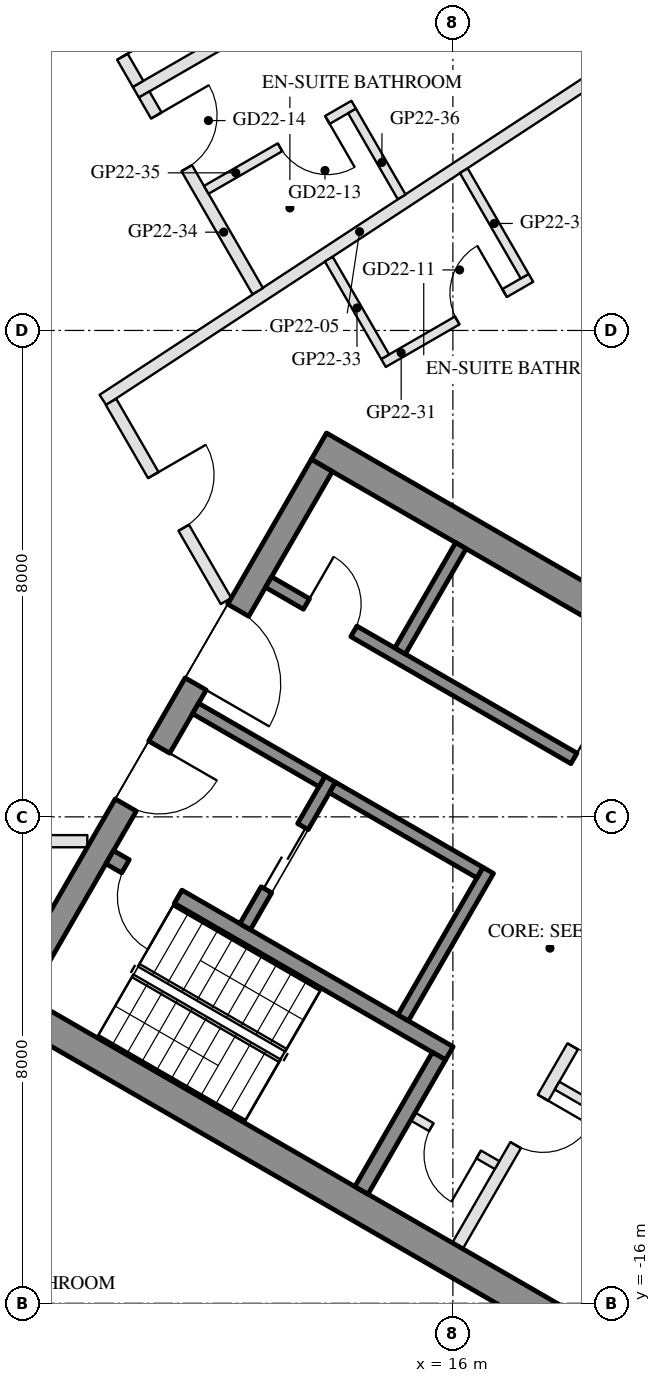
"""IFC4 building model, lengths in metres.
Left out: names, types, materials, properties, quantities, classifications, styles, units other than length and angle.
Written with IfcOpenShell. Run it as: python <this file> out.ifc"""

import sys

from ifc_helpers import new_model, si_unit, direction, frame, frame_2d, origin, place, context, subcontext, project, spatial, rectangle, extrude, element, fill, save


model = new_model("IFC4")
c1 = context("Model", 3, precision=1e-05, world=origin(), true_north=direction((0.0, 1.0)))
c2 = subcontext(c1, "Body", "Model", "MODEL_VIEW")
j1 = project(units=[si_unit("LENGTHUNIT", "METRE"), si_unit("PLANEANGLEUNIT", "RADIAN")], contexts=[c1])
p1 = place(None, origin())
s1 = spatial("IfcSite", under=j1, at=p1, CompositionType="ELEMENT")
p2 = place(p1, origin())
s2 = spatial("IfcBuilding", under=s1, at=p2, CompositionType="ELEMENT")
p3 = place(p2, frame((0.0, 0.0, 224.3)))
s3 = spatial("IfcBuildingStorey", under=s2, at=p3, CompositionType="ELEMENT", Elevation=224.3)
p4 = place(p3, frame((19.729, 2.938, 0.0), z_axis=(0.0, 0.0, 1.0), x_axis=(-0.499976430342, 0.866039011305, 0.0)))
e1 = element("IfcWall", 1, at=p4, inside=s3, PredefinedType="SOLIDWALL", context=c2, shape_type="SweptSolid", body=[
    extrude(rectangle(XDim=6.74, YDim=0.35, at=frame_2d((3.37, 0.0))), origin(), (0.0, 0.0, 1.0), 3.55),
])
p5 = place(p4, frame((2.229, 0.0, 0.0)))
e2 = element("IfcOpeningElement", 2, at=p5, cuts=e1, PredefinedType="OPENING", context=c2, shape_type="SweptSolid", body=[
    extrude(rectangle(XDim=1.5, YDim=2.4, at=frame_2d((0.75, 1.2))), frame((0.0, 0.185, 0.0), z_axis=(0.0, -1.0, 0.0), x_axis=(1.0, 0.0, 0.0)), (0.0, 0.0, 1.0), 0.37),
])
p6 = place(p4, frame((4.029, 0.0, 0.3)))
e3 = element("IfcOpeningElement", 3, at=p6, cuts=e1, PredefinedType="OPENING", context=c2, shape_type="SweptSolid", body=[
    extrude(rectangle(XDim=0.8, YDim=2.65, at=frame_2d((0.4, 1.325))), frame((0.0, 0.185, 0.0), z_axis=(0.0, -1.0, 0.0), x_axis=(1.0, 0.0, 0.0)), (0.0, 0.0, 1.0), 0.37),
])
for number, where, z_axis, x_axis in (
    (4, (8.547, -10.997, 0.0), (0.0, 0.0, 1.0), (0.866, -0.5, 0.0)),
    (5, (13.797, -1.903, 0.0), (0.0, 0.0, 1.0), (0.866, -0.5, 0.0)),
):
    element("IfcWall", number, at=place(p3, frame(where, z_axis=z_axis, x_axis=x_axis)), inside=s3, PredefinedType="SHEAR", context=c2, shape_type="SweptSolid", body=[
        extrude(rectangle(XDim=14.837, YDim=0.5, at=frame_2d((7.418, 0.0))), origin(), (0.0, 0.0, 1.0), 3.5),
    ])
p7 = place(p3, frame((8.845, -10.88, 0.0), z_axis=(0.0, 0.0, 1.0), x_axis=(0.500004234368, 0.866022959057, 0.0)))
e6 = element("IfcWall", 6, at=p7, inside=s3, PredefinedType="SHEAR", context=c2, shape_type="SweptSolid", body=[
    extrude(rectangle(XDim=10.0, YDim=0.4, at=frame_2d((5.0, 0.0))), origin(), (0.0, 0.0, 1.0), 3.5),
])
p8 = place(p7, frame((3.55, 0.0, 0.0)))
e7 = element("IfcOpeningElement", 7, at=p8, cuts=e6, PredefinedType="OPENING", context=c2, shape_type="SweptSolid", body=[
    extrude(rectangle(XDim=1.1, YDim=2.1, at=frame_2d((0.55, 1.05))), frame((0.0, 0.21, 0.0), z_axis=(0.0, -1.0, 0.0), x_axis=(1.0, 0.0, 0.0)), (0.0, 0.0, 1.0), 0.42),
])
p9 = place(p7, frame((5.85, 0.0, 0.0)))
e8 = element("IfcOpeningElement", 8, at=p9, cuts=e6, PredefinedType="OPENING", context=c2, shape_type="SweptSolid", body=[
    extrude(rectangle(XDim=1.4, YDim=2.1, at=frame_2d((0.7, 1.05))), frame((0.0, 0.21, 0.0), z_axis=(0.0, -1.0, 0.0), x_axis=(1.0, 0.0, 0.0)), (0.0, 0.0, 1.0), 0.42),
])
p10 = place(p3, frame((10.356, -8.664, 0.0), z_axis=(0.0, 0.0, 1.0), x_axis=(0.866028629588, -0.499994412703, 0.0)))
e9 = element("IfcWall", 9, at=p10, inside=s3, PredefinedType="SHEAR", context=c2, shape_type="SweptSolid", body=[
    extrude(rectangle(XDim=6.45, YDim=0.25, at=frame_2d((3.225, 0.0))), origin(), (0.0, 0.0, 1.0), 3.5),
])
p11 = place(p10, frame((0.3, 0.0, 0.0)))
e10 = element("IfcOpeningElement", 10, at=p11, cuts=e9, PredefinedType="OPENING", context=c2, shape_type="SweptSolid", body=[
    extrude(rectangle(XDim=1.0, YDim=2.1, at=frame_2d((0.5, 1.05))), frame((0.0, 0.135, 0.0), z_axis=(0.0, -1.0, 0.0), x_axis=(1.0, 0.0, 0.0)), (0.0, 0.0, 1.0), 0.27),
])
p12 = place(p3, frame((14.496, -14.143, 0.0), z_axis=(0.0, 0.0, 1.0), x_axis=(0.500062241894, 0.865989465428, 0.0)))
e11 = element("IfcWall", 11, at=p12, inside=s3, PredefinedType="SHEAR", context=c2, shape_type="SweptSolid", body=[
    extrude(rectangle(XDim=2.55, YDim=0.25, at=frame_2d((1.275, 0.0))), origin(), (0.0, 0.0, 1.0), 3.5),
])
p13 = place(p3, frame((15.181, -11.305, 0.0), z_axis=(0.0, 0.0, 1.0), x_axis=(0.49994636267, 0.866056369097, 0.0)))
e12 = element("IfcWall", 12, at=p13, inside=s3, PredefinedType="SHEAR", context=c2, shape_type="SweptSolid", body=[
    extrude(rectangle(XDim=2.8, YDim=0.2, at=frame_2d((1.4, 0.0))), origin(), (0.0, 0.0, 1.0), 3.5),
])
p14 = place(p3, frame((12.583, -9.805, 0.0), z_axis=(0.0, 0.0, 1.0), x_axis=(0.49994636267, 0.866056369097, 0.0)))
e13 = element("IfcWall", 13, at=p14, inside=s3, PredefinedType="SHEAR", context=c2, shape_type="SweptSolid", body=[
    extrude(rectangle(XDim=2.8, YDim=0.2, at=frame_2d((1.4, 0.0))), origin(), (0.0, 0.0, 1.0), 3.5),
])
p15 = place(p14, frame((0.7, 0.0, 0.0)))
e14 = element("IfcOpeningElement", 14, at=p15, cuts=e13, PredefinedType="OPENING", context=c2, shape_type="SweptSolid", body=[
    extrude(rectangle(XDim=1.2, YDim=2.1, at=frame_2d((0.6, 1.05))), frame((0.0, 0.11, 0.0), z_axis=(0.0, -1.0, 0.0), x_axis=(1.0, 0.0, 0.0)), (0.0, 0.0, 1.0), 0.22),
])
p16 = place(p3, frame((11.768, -6.217, 0.0), z_axis=(0.0, 0.0, 1.0), x_axis=(0.866050077142, -0.499957262057, 0.0)))
e15 = element("IfcWall", 15, at=p16, inside=s3, PredefinedType="SHEAR", context=c2, shape_type="SweptSolid", body=[
    extrude(rectangle(XDim=2.4, YDim=0.2, at=frame_2d((1.2, 0.0))), origin(), (0.0, 0.0, 1.0), 3.5),
])
p17 = place(p3, frame((14.02, -7.517, 0.0), z_axis=(0.0, 0.0, 1.0), x_axis=(0.866034573852, -0.49998411664, 0.0)))
e16 = element("IfcWall", 16, at=p17, inside=s3, PredefinedType="SHEAR", context=c2, shape_type="SweptSolid", body=[
    extrude(rectangle(XDim=2.8, YDim=0.2, at=frame_2d((1.4, 0.0))), origin(), (0.0, 0.0, 1.0), 3.5),
])
p18 = place(p3, frame((12.968, -4.138, 0.0), z_axis=(0.0, 0.0, 1.0), x_axis=(0.866028328073, -0.49999493495, 0.0)))
e17 = element("IfcWall", 17, at=p18, inside=s3, PredefinedType="SHEAR", context=c2, shape_type="SweptSolid", body=[
    extrude(rectangle(XDim=10.16, YDim=0.2, at=frame_2d((5.08, 0.0))), origin(), (0.0, 0.0, 1.0), 3.5),
])
p19 = place(p18, frame((0.72, 0.0, 0.0)))
e18 = element("IfcOpeningElement", 18, at=p19, cuts=e17, PredefinedType="OPENING", context=c2, shape_type="SweptSolid", body=[
    extrude(rectangle(XDim=0.9, YDim=2.1, at=frame_2d((0.45, 1.05))), frame((0.0, 0.11, 0.0), z_axis=(0.0, -1.0, 0.0), x_axis=(1.0, 0.0, 0.0)), (0.0, 0.0, 1.0), 0.22),
])
p20 = place(p18, frame((5.8, 0.0, 0.0)))
e19 = element("IfcOpeningElement", 19, at=p20, cuts=e17, PredefinedType="OPENING", context=c2, shape_type="SweptSolid", body=[
    extrude(rectangle(XDim=0.9, YDim=2.1, at=frame_2d((0.45, 1.05))), frame((0.0, 0.11, 0.0), z_axis=(0.0, -1.0, 0.0), x_axis=(1.0, 0.0, 0.0)), (0.0, 0.0, 1.0), 0.22),
])
p21 = place(p3, frame((15.131, -5.272, 0.0), z_axis=(0.0, 0.0, 1.0), x_axis=(0.499972520799, 0.866041268327, 0.0)))
e20 = element("IfcWall", 20, at=p21, inside=s3, PredefinedType="SHEAR", context=c2, shape_type="SweptSolid", body=[
    extrude(rectangle(XDim=2.0, YDim=0.2, at=frame_2d((1.0, 0.0))), origin(), (0.0, 0.0, 1.0), 3.5),
])
p22 = place(p3, frame((16.076, -15.055, 0.0), z_axis=(0.0, 0.0, 1.0), x_axis=(0.499995103361, 0.866028230842, 0.0)))
e21 = element("IfcWall", 21, at=p22, inside=s3, PredefinedType="PARTITIONING", context=c2, shape_type="SweptSolid", body=[
    extrude(rectangle(XDim=5.4, YDim=0.2, at=frame_2d((2.7, 0.0))), origin(), (0.0, 0.0, 1.0), 3.5),
])
p23 = place(p22, frame((1.913, 0.0, 0.0)))
e22 = element("IfcOpeningElement", 22, at=p23, cuts=e21, PredefinedType="OPENING", context=c2, shape_type="SweptSolid", body=[
    extrude(rectangle(XDim=0.9, YDim=2.1, at=frame_2d((0.45, 1.05))), frame((0.0, 0.11, 0.0), z_axis=(0.0, -1.0, 0.0), x_axis=(1.0, 0.0, 0.0)), (0.0, 0.0, 1.0), 0.22),
])
p24 = place(p22, frame((3.788, 0.0, 0.0)))
e23 = element("IfcOpeningElement", 23, at=p24, cuts=e21, PredefinedType="OPENING", context=c2, shape_type="SweptSolid", body=[
    extrude(rectangle(XDim=0.9, YDim=2.1, at=frame_2d((0.45, 1.05))), frame((0.0, 0.11, 0.0), z_axis=(0.0, -1.0, 0.0), x_axis=(1.0, 0.0, 0.0)), (0.0, 0.0, 1.0), 0.22),
])
p25 = place(p3, frame((15.342, -12.928, 0.0), z_axis=(0.0, 0.0, 1.0), x_axis=(0.865989903783, -0.500061482766, 0.0)))
e24 = element("IfcWall", 24, at=p25, inside=s3, PredefinedType="PARTITIONING", context=c2, shape_type="SweptSolid", body=[
    extrude(rectangle(XDim=1.6, YDim=0.15, at=frame_2d((0.8, 0.0))), origin(), (0.0, 0.0, 1.0), 3.5),
])
p26 = place(p25, frame((0.35, 0.0, 0.0)))
e25 = element("IfcOpeningElement", 25, at=p26, cuts=e24, PredefinedType="OPENING", context=c2, shape_type="SweptSolid", body=[
    extrude(rectangle(XDim=0.9, YDim=2.1, at=frame_2d((0.45, 1.05))), frame((0.0, 0.085, 0.0), z_axis=(0.0, -1.0, 0.0), x_axis=(1.0, 0.0, 0.0)), (0.0, 0.0, 1.0), 0.17),
])
p27 = place(p3, frame((17.713, -12.42, 0.0), z_axis=(0.0, 0.0, 1.0), x_axis=(0.866016523273, -0.500015381182, 0.0)))
e26 = element("IfcWall", 26, at=p27, inside=s3, PredefinedType="PARTITIONING", context=c2, shape_type="SweptSolid", body=[
    extrude(rectangle(XDim=6.95, YDim=0.15, at=frame_2d((3.475, 0.0))), origin(), (0.0, 0.0, 1.0), 3.5),
])
p28 = place(p3, frame((18.688, 4.391, 0.0), z_axis=(0.0, 0.0, 1.0), x_axis=(-0.836395760685, -0.548126017909, 0.0)))
e27 = element("IfcWall", 27, at=p28, inside=s3, PredefinedType="PARTITIONING", context=c2, shape_type="SweptSolid", body=[
    extrude(rectangle(XDim=10.096, YDim=0.2, at=frame_2d((5.048, 0.0))), origin(), (0.0, 0.0, 1.0), 3.06),
])
p29 = place(p3, frame((16.917, 7.458, 0.0), z_axis=(0.0, 0.0, 1.0), x_axis=(-0.866019052629, -0.500011000363, 0.0)))
e28 = element("IfcWall", 28, at=p29, inside=s3, PredefinedType="PARTITIONING", context=c2, shape_type="SweptSolid", body=[
    extrude(rectangle(XDim=7.08, YDim=0.2, at=frame_2d((3.54, 0.0))), origin(), (0.0, 0.0, 1.0), 3.06),
])
p30 = place(p3, frame((9.988, -8.4, 0.0), z_axis=(0.0, 0.0, 1.0), x_axis=(-1.0, 0.0, 0.0)))
e29 = element("IfcWall", 29, at=p30, inside=s3, PredefinedType="PARTITIONING", context=c2, shape_type="SweptSolid", body=[
    extrude(rectangle(XDim=3.788, YDim=0.2, at=frame_2d((1.894, 0.0))), origin(), (0.0, 0.0, 1.0), 2.95),
])
p31 = place(p30, frame((1.394, 0.0, 0.0)))
e30 = element("IfcOpeningElement", 30, at=p31, cuts=e29, PredefinedType="OPENING", context=c2, shape_type="SweptSolid", body=[
    extrude(rectangle(XDim=1.0, YDim=2.1, at=frame_2d((0.5, 1.05))), frame((0.0, 0.11, 0.0), z_axis=(0.0, -1.0, 0.0), x_axis=(1.0, 0.0, 0.0)), (0.0, 0.0, 1.0), 0.22),
])
p32 = place(p3, frame((10.377, -1.174, 0.0), z_axis=(0.0, 0.0, 1.0), x_axis=(0.500033471514, -0.866006078134, 0.0)))
e31 = element("IfcWall", 31, at=p32, inside=s3, PredefinedType="PARTITIONING", context=c2, shape_type="SweptSolid", body=[
    extrude(rectangle(XDim=3.782, YDim=0.2, at=frame_2d((1.891, 0.0))), origin(), (0.0, 0.0, 1.0), 2.95),
])
p33 = place(p32, frame((1.391, 0.0, 0.0)))
e32 = element("IfcOpeningElement", 32, at=p33, cuts=e31, PredefinedType="OPENING", context=c2, shape_type="SweptSolid", body=[
    extrude(rectangle(XDim=1.0, YDim=2.1, at=frame_2d((0.5, 1.05))), frame((0.0, 0.11, 0.0), z_axis=(0.0, -1.0, 0.0), x_axis=(1.0, 0.0, 0.0)), (0.0, 0.0, 1.0), 0.22),
])
p34 = place(p3, frame((14.858, -0.536, 0.0), z_axis=(0.0, 0.0, 1.0), x_axis=(0.866056369097, 0.49994636267, 0.0)))
e33 = element("IfcWall", 33, at=p34, inside=s3, PredefinedType="PARTITIONING", context=c2, shape_type="SweptSolid", body=[
    extrude(rectangle(XDim=2.8, YDim=0.15, at=frame_2d((1.4, 0.0))), origin(), (0.0, 0.0, 1.0), 2.95),
])
p35 = place(p34, frame((1.4, 0.0, 0.0)))
e34 = element("IfcOpeningElement", 34, at=p35, cuts=e33, PredefinedType="OPENING", context=c2, shape_type="SweptSolid", body=[
    extrude(rectangle(XDim=0.9, YDim=2.1, at=frame_2d((0.45, 1.05))), frame((0.0, 0.085, 0.0), z_axis=(0.0, -1.0, 0.0), x_axis=(1.0, 0.0, 0.0)), (0.0, 0.0, 1.0), 0.17),
])
p36 = place(p3, frame((17.181, 0.892, 0.0), z_axis=(0.0, 0.0, 1.0), x_axis=(-0.500056363668, 0.86599285976, 0.0)))
e35 = element("IfcWall", 35, at=p36, inside=s3, PredefinedType="PARTITIONING", context=c2, shape_type="SweptSolid", body=[
    extrude(rectangle(XDim=2.004, YDim=0.15, at=frame_2d((1.002, 0.0))), origin(), (0.0, 0.0, 1.0), 2.95),
])
p37 = place(p3, frame((14.886, -0.433, 0.0), z_axis=(0.0, 0.0, 1.0), x_axis=(-0.500075767815, 0.865981654797, 0.0)))
e36 = element("IfcWall", 36, at=p37, inside=s3, PredefinedType="PARTITIONING", context=c2, shape_type="SweptSolid", body=[
    extrude(rectangle(XDim=1.854, YDim=0.15, at=frame_2d((0.927, 0.0))), origin(), (0.0, 0.0, 1.0), 2.95),
])
p38 = place(p3, frame((10.923, 3.881, 0.0), z_axis=(0.0, 0.0, 1.0), x_axis=(0.499997756806, -0.866026698889, 0.0)))
e37 = element("IfcWall", 37, at=p38, inside=s3, PredefinedType="PARTITIONING", context=c2, shape_type="SweptSolid", body=[
    extrude(rectangle(XDim=3.736, YDim=0.2, at=frame_2d((1.868, 0.0))), origin(), (0.0, 0.0, 1.0), 2.95),
])
p39 = place(p38, frame((0.4, 0.0, 0.0)))
e38 = element("IfcOpeningElement", 38, at=p39, cuts=e37, PredefinedType="OPENING", context=c2, shape_type="SweptSolid", body=[
    extrude(rectangle(XDim=1.0, YDim=2.1, at=frame_2d((0.5, 1.05))), frame((0.0, 0.11, 0.0), z_axis=(0.0, -1.0, 0.0), x_axis=(1.0, 0.0, 0.0)), (0.0, 0.0, 1.0), 0.22),
])
p40 = place(p3, frame((14.369, 3.712, 0.0), z_axis=(0.0, 0.0, 1.0), x_axis=(-0.866034573852, -0.49998411664, 0.0)))
e39 = element("IfcWall", 39, at=p40, inside=s3, PredefinedType="PARTITIONING", context=c2, shape_type="SweptSolid", body=[
    extrude(rectangle(XDim=2.8, YDim=0.15, at=frame_2d((1.4, 0.0))), origin(), (0.0, 0.0, 1.0), 2.95),
])
p41 = place(p40, frame((0.5, 0.0, 0.0)))
e40 = element("IfcOpeningElement", 40, at=p41, cuts=e39, PredefinedType="OPENING", context=c2, shape_type="SweptSolid", body=[
    extrude(rectangle(XDim=0.9, YDim=2.1, at=frame_2d((0.45, 1.05))), frame((0.0, 0.085, 0.0), z_axis=(0.0, -1.0, 0.0), x_axis=(1.0, 0.0, 0.0)), (0.0, 0.0, 1.0), 0.17),
])
p42 = place(p3, frame((15.157, 2.197, 0.0), z_axis=(0.0, 0.0, 1.0), x_axis=(-0.500033287521, 0.866006184372, 0.0)))
e41 = element("IfcWall", 41, at=p42, inside=s3, PredefinedType="PARTITIONING", context=c2, shape_type="SweptSolid", body=[
    extrude(rectangle(XDim=1.632, YDim=0.15, at=frame_2d((0.816, 0.0))), origin(), (0.0, 0.0, 1.0), 2.95),
])
p43 = place(p3, frame((8.842, 7.485, 0.0), z_axis=(0.0, 0.0, 1.0), x_axis=(0.500030109098, -0.866008019591, 0.0)))
e42 = element("IfcWall", 42, at=p43, inside=s3, PredefinedType="PARTITIONING", context=c2, shape_type="SweptSolid", body=[
    extrude(rectangle(XDim=3.961, YDim=0.2, at=frame_2d((1.98, 0.0))), origin(), (0.0, 0.0, 1.0), 2.95),
])
p44 = place(p43, frame((2.444, 0.0, 0.0)))
e43 = element("IfcOpeningElement", 43, at=p44, cuts=e42, PredefinedType="OPENING", context=c2, shape_type="SweptSolid", body=[
    extrude(rectangle(XDim=1.0, YDim=2.1, at=frame_2d((0.5, 1.05))), frame((0.0, 0.11, 0.0), z_axis=(0.0, -1.0, 0.0), x_axis=(1.0, 0.0, 0.0)), (0.0, 0.0, 1.0), 0.22),
])
p45 = place(p15, origin())
e44 = element("IfcDoor", 44, at=p45, inside=s3, OperationType="DOUBLE_DOOR_SLIDING", PredefinedType="DOOR", context=c2, shape_type="SweptSolid", body=[
    extrude(rectangle(XDim=1.2, YDim=2.1, at=frame_2d((0.6, 1.05))), frame((0.0, 0.025, 0.0), z_axis=(0.0, -1.0, 0.0), x_axis=(1.0, 0.0, 0.0)), (0.0, 0.0, 1.0), 0.05),
])
fill(e14, e44)
p46 = place(p26, frame((0.9, 0.0, 0.0), z_axis=(0.0, 0.0, 1.0), x_axis=(-1.0, 0.0, 0.0)))
e45 = element("IfcDoor", 45, at=p46, inside=s3, OperationType="SINGLE_SWING_LEFT", PredefinedType="DOOR", context=c2, shape_type="SweptSolid", body=[
    extrude(rectangle(XDim=0.9, YDim=2.1, at=frame_2d((0.45, 1.05))), frame((0.0, 0.025, 0.0), z_axis=(0.0, -1.0, 0.0), x_axis=(1.0, 0.0, 0.0)), (0.0, 0.0, 1.0), 0.05),
])
fill(e25, e45)
p47 = place(p19, origin())
e46 = element("IfcDoor", 46, at=p47, inside=s3, OperationType="SINGLE_SWING_LEFT", PredefinedType="DOOR", context=c2, shape_type="SweptSolid", body=[
    extrude(rectangle(XDim=0.9, YDim=2.1, at=frame_2d((0.45, 1.05))), frame((0.0, 0.025, 0.0), z_axis=(0.0, -1.0, 0.0), x_axis=(1.0, 0.0, 0.0)), (0.0, 0.0, 1.0), 0.05),
])
fill(e18, e46)
p48 = place(p20, origin())
e47 = element("IfcDoor", 47, at=p48, inside=s3, OperationType="SINGLE_SWING_LEFT", PredefinedType="DOOR", context=c2, shape_type="SweptSolid", body=[
    extrude(rectangle(XDim=0.9, YDim=2.1, at=frame_2d((0.45, 1.05))), frame((0.0, 0.025, 0.0), z_axis=(0.0, -1.0, 0.0), x_axis=(1.0, 0.0, 0.0)), (0.0, 0.0, 1.0), 0.05),
])
fill(e19, e47)
p49 = place(p23, frame((0.9, 0.0, 0.0), z_axis=(0.0, 0.0, 1.0), x_axis=(-1.0, 0.0, 0.0)))
e48 = element("IfcDoor", 48, at=p49, inside=s3, OperationType="SINGLE_SWING_LEFT", PredefinedType="DOOR", context=c2, shape_type="SweptSolid", body=[
    extrude(rectangle(XDim=0.9, YDim=2.1, at=frame_2d((0.45, 1.05))), frame((0.0, 0.025, 0.0), z_axis=(0.0, -1.0, 0.0), x_axis=(1.0, 0.0, 0.0)), (0.0, 0.0, 1.0), 0.05),
])
fill(e22, e48)
p50 = place(p24, frame((0.9, 0.0, 0.0), z_axis=(0.0, 0.0, 1.0), x_axis=(-1.0, 0.0, 0.0)))
e49 = element("IfcDoor", 49, at=p50, inside=s3, OperationType="SINGLE_SWING_LEFT", PredefinedType="DOOR", context=c2, shape_type="SweptSolid", body=[
    extrude(rectangle(XDim=0.9, YDim=2.1, at=frame_2d((0.45, 1.05))), frame((0.0, 0.025, 0.0), z_axis=(0.0, -1.0, 0.0), x_axis=(1.0, 0.0, 0.0)), (0.0, 0.0, 1.0), 0.05),
])
fill(e23, e49)
p51 = place(p8, frame((1.1, 0.0, 0.0), z_axis=(0.0, 0.0, 1.0), x_axis=(-1.0, 0.0, 0.0)))
e50 = element("IfcDoor", 50, at=p51, inside=s3, OperationType="SINGLE_SWING_LEFT", PredefinedType="DOOR", context=c2, shape_type="SweptSolid", body=[
    extrude(rectangle(XDim=1.1, YDim=2.1, at=frame_2d((0.55, 1.05))), frame((0.0, 0.025, 0.0), z_axis=(0.0, -1.0, 0.0), x_axis=(1.0, 0.0, 0.0)), (0.0, 0.0, 1.0), 0.05),
])
fill(e7, e50)
p52 = place(p9, frame((1.4, 0.0, 0.0), z_axis=(0.0, 0.0, 1.0), x_axis=(-1.0, 0.0, 0.0)))
e51 = element("IfcDoor", 51, at=p52, inside=s3, OperationType="DOUBLE_DOOR_SINGLE_SWING", PredefinedType="DOOR", context=c2, shape_type="SweptSolid", body=[
    extrude(rectangle(XDim=1.4, YDim=2.1, at=frame_2d((0.7, 1.05))), frame((0.0, 0.025, 0.0), z_axis=(0.0, -1.0, 0.0), x_axis=(1.0, 0.0, 0.0)), (0.0, 0.0, 1.0), 0.05),
])
fill(e8, e51)
p53 = place(p11, frame((1.0, 0.0, 0.0), z_axis=(0.0, 0.0, 1.0), x_axis=(-1.0, 0.0, 0.0)))
e52 = element("IfcDoor", 52, at=p53, inside=s3, OperationType="SINGLE_SWING_LEFT", PredefinedType="DOOR", context=c2, shape_type="SweptSolid", body=[
    extrude(rectangle(XDim=1.0, YDim=2.1, at=frame_2d((0.5, 1.05))), frame((0.0, 0.025, 0.0), z_axis=(0.0, -1.0, 0.0), x_axis=(1.0, 0.0, 0.0)), (0.0, 0.0, 1.0), 0.05),
])
fill(e10, e52)
p54 = place(p35, origin())
e53 = element("IfcDoor", 53, at=p54, inside=s3, OperationType="SINGLE_SWING_RIGHT", PredefinedType="DOOR", context=c2, shape_type="SweptSolid", body=[
    extrude(rectangle(XDim=0.9, YDim=2.1, at=frame_2d((0.45, 1.05))), frame((0.0, 0.025, 0.0), z_axis=(0.0, -1.0, 0.0), x_axis=(1.0, 0.0, 0.0)), (0.0, 0.0, 1.0), 0.05),
])
fill(e34, e53)
p55 = place(p33, origin())
e54 = element("IfcDoor", 54, at=p55, inside=s3, OperationType="SINGLE_SWING_LEFT", PredefinedType="DOOR", context=c2, shape_type="SweptSolid", body=[
    extrude(rectangle(XDim=1.0, YDim=2.1, at=frame_2d((0.5, 1.05))), frame((0.0, 0.025, 0.0), z_axis=(0.0, -1.0, 0.0), x_axis=(1.0, 0.0, 0.0)), (0.0, 0.0, 1.0), 0.05),
])
fill(e32, e54)
p56 = place(p41, origin())
e55 = element("IfcDoor", 55, at=p56, inside=s3, OperationType="SINGLE_SWING_LEFT", PredefinedType="DOOR", context=c2, shape_type="SweptSolid", body=[
    extrude(rectangle(XDim=0.9, YDim=2.1, at=frame_2d((0.45, 1.05))), frame((0.0, 0.025, 0.0), z_axis=(0.0, -1.0, 0.0), x_axis=(1.0, 0.0, 0.0)), (0.0, 0.0, 1.0), 0.05),
])
fill(e40, e55)
p57 = place(p39, origin())
e56 = element("IfcDoor", 56, at=p57, inside=s3, OperationType="SINGLE_SWING_LEFT", PredefinedType="DOOR", context=c2, shape_type="SweptSolid", body=[
    extrude(rectangle(XDim=1.0, YDim=2.1, at=frame_2d((0.5, 1.05))), frame((0.0, 0.025, 0.0), z_axis=(0.0, -1.0, 0.0), x_axis=(1.0, 0.0, 0.0)), (0.0, 0.0, 1.0), 0.05),
])
fill(e38, e56)
p58 = place(p44, origin())
e57 = element("IfcDoor", 57, at=p58, inside=s3, OperationType="SINGLE_SWING_RIGHT", PredefinedType="DOOR", context=c2, shape_type="SweptSolid", body=[
    extrude(rectangle(XDim=1.0, YDim=2.1, at=frame_2d((0.5, 1.05))), frame((0.0, 0.025, 0.0), z_axis=(0.0, -1.0, 0.0), x_axis=(1.0, 0.0, 0.0)), (0.0, 0.0, 1.0), 0.05),
])
fill(e43, e57)
save(model, sys.argv[1])
